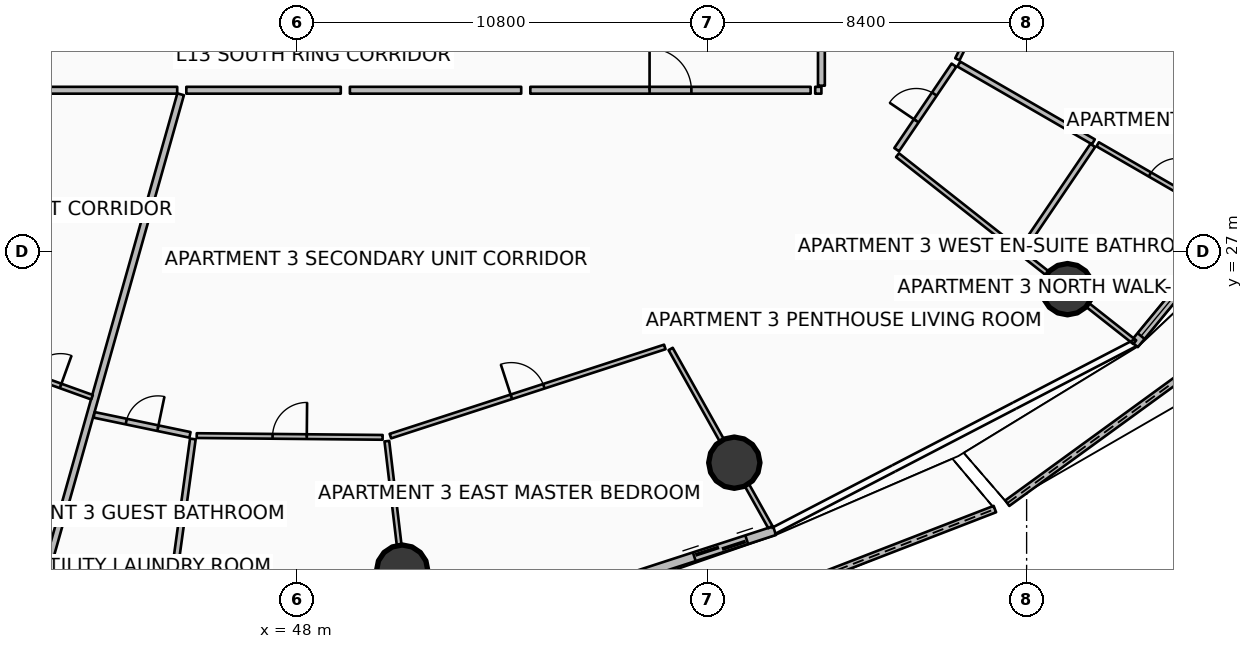
"""IFC4 building model, lengths in metres.
Left out: names, types, materials, properties, quantities, classifications, styles, units other than length and angle.
Written with IfcOpenShell. Run it as: python <this file> out.ifc"""

import sys

from ifc_helpers import new_model, si_unit, direction, frame, frame_2d, origin, origin_2d, place, context, subcontext, project, spatial, polyline, rectangle, circle, outline, extrude, element, fill, save


model = new_model("IFC4")
c1 = context("Model", 3, precision=1e-05, world=origin(), true_north=direction((0.0, 1.0)))
c2 = subcontext(c1, "Body", "Model", "MODEL_VIEW")
j1 = project(units=[si_unit("LENGTHUNIT", "METRE"), si_unit("PLANEANGLEUNIT", "RADIAN")], contexts=[c1])
p1 = place(None, origin())
s1 = spatial("IfcSite", under=j1, at=p1, CompositionType="ELEMENT")
p2 = place(p1, origin())
s2 = spatial("IfcBuilding", under=s1, at=p2, CompositionType="ELEMENT")
p3 = place(p2, frame((0.0, 0.0, 56.4)))
s3 = spatial("IfcBuildingStorey", under=s2, at=p3, CompositionType="ELEMENT", Elevation=56.4)
for number, where, z_axis, x_axis in (
    (1, (50.768, 18.611, 0.0), (0.0, 0.0, 1.0), (1.0, 0.0, 0.0)),
    (2, (59.508, 21.45, 0.0), (0.0, 0.0, 1.0), (1.0, 0.0, 0.0)),
    (3, (68.276, 26.016, 0.0), (0.0, 0.0, 1.0), (1.0, 0.0, 0.0)),
):
    element("IfcColumn", number, at=place(p3, frame(where, z_axis=z_axis, x_axis=x_axis)), inside=s3, PredefinedType="COLUMN", context=c2, shape_type="SweptSolid", body=[
        extrude(circle(Radius=0.675, at=origin_2d()), origin(), (0.0, 0.0, 1.0), 3.5),
    ])
p4 = place(p3, frame((56.446, 16.394, 0.0), z_axis=(0.0, 0.0, 1.0), x_axis=(0.932670029618, 0.360730669409, 0.0)))
e4 = element("IfcWall", 4, at=p4, inside=s3, PredefinedType="PARAPET", context=c2, shape_type="SweptSolid", body=[
    extrude(outline(polyline([(0.0, 0.0), (10.635, 0.0), (10.635, 1.224), (5.317, 1.127), (0.0, 1.148), (0.0, 0.0)])), frame((0.0, 0.09, 0.0), z_axis=(0.0, -1.0, 0.0), x_axis=(1.0, 0.0, 0.0)), (0.0, 0.0, 1.0), 0.18),
])
p5 = place(p3, frame((66.691, 20.385, 0.0), z_axis=(0.0, 0.0, 1.0), x_axis=(0.808711385096, 0.588205657586, 0.0)))
e5 = element("IfcWall", 5, at=p5, inside=s3, PredefinedType="PARAPET", context=c2, shape_type="SweptSolid", body=[
    extrude(outline(polyline([(0.0, 0.0), (11.969, 0.0), (11.969, 1.632), (5.984, 1.418), (0.0, 1.233), (0.0, 0.0)])), frame((0.0, 0.09, 0.0), z_axis=(0.0, -1.0, 0.0), x_axis=(1.0, 0.0, 0.0)), (0.0, 0.0, 1.0), 0.18),
])
p6 = place(p3, frame((50.964, 16.542, 0.0), z_axis=(0.0, 0.0, 1.0), x_axis=(0.951054679225, 0.309022648238, 0.0)))
e6 = element("IfcWall", 6, at=p6, inside=s3, PredefinedType="SOLIDWALL", context=c2, shape_type="SweptSolid", body=[
    extrude(rectangle(XDim=10.097, YDim=0.24, at=frame_2d((5.048, 0.0))), origin(), (0.0, 0.0, 1.0), 2.45),
])
p7 = place(p6, frame((7.877, 0.0, 0.0)))
e7 = element("IfcOpeningElement", 7, at=p7, cuts=e6, PredefinedType="OPENING", context=c2, shape_type="SweptSolid", body=[
    extrude(rectangle(XDim=1.45, YDim=2.15, at=frame_2d((0.725, 1.075))), frame((0.0, 0.13, 0.0), z_axis=(0.0, -1.0, 0.0), x_axis=(1.0, 0.0, 0.0)), (0.0, 0.0, 1.0), 0.26),
])
p8 = place(p6, frame((0.28, 0.0, 0.65)))
e8 = element("IfcOpeningElement", 8, at=p8, cuts=e6, PredefinedType="OPENING", context=c2, shape_type="SweptSolid", body=[
    extrude(rectangle(XDim=1.6, YDim=1.5, at=frame_2d((0.8, 0.75))), frame((0.0, 0.13, 0.0), z_axis=(0.0, -1.0, 0.0), x_axis=(1.0, 0.0, 0.0)), (0.0, 0.0, 1.0), 0.26),
])
p9 = place(p3, frame((70.033, 24.567, 0.0), z_axis=(0.0, 0.0, 1.0), x_axis=(0.636674332663, 0.771132799281, 0.0)))
e9 = element("IfcWall", 9, at=p9, inside=s3, PredefinedType="SOLIDWALL", context=c2, shape_type="SweptSolid", body=[
    extrude(rectangle(XDim=11.851, YDim=0.24, at=frame_2d((5.926, 0.0))), origin(), (0.0, 0.0, 1.0), 2.45),
])
p10 = place(p9, frame((9.631, 0.0, 0.0)))
e10 = element("IfcOpeningElement", 10, at=p10, cuts=e9, PredefinedType="OPENING", context=c2, shape_type="SweptSolid", body=[
    extrude(rectangle(XDim=1.45, YDim=2.15, at=frame_2d((0.725, 1.075))), frame((0.0, 0.13, 0.0), z_axis=(0.0, -1.0, 0.0), x_axis=(1.0, 0.0, 0.0)), (0.0, 0.0, 1.0), 0.26),
])
p11 = place(p9, frame((0.28, 0.0, 0.65)))
e11 = element("IfcOpeningElement", 11, at=p11, cuts=e9, PredefinedType="OPENING", context=c2, shape_type="SweptSolid", body=[
    extrude(rectangle(XDim=1.6, YDim=1.5, at=frame_2d((0.8, 0.75))), frame((0.0, 0.13, 0.0), z_axis=(0.0, -1.0, 0.0), x_axis=(1.0, 0.0, 0.0)), (0.0, 0.0, 1.0), 0.26),
])
p12 = place(p3, frame((44.938, 31.144, 0.0), z_axis=(0.0, 0.0, 1.0), x_axis=(-0.27143758514, -0.962456044385, 0.0)))
e12 = element("IfcWall", 12, at=p12, inside=s3, PredefinedType="PARTITIONING", context=c2, shape_type="SweptSolid", body=[
    extrude(rectangle(XDim=16.693, YDim=0.18, at=frame_2d((8.346, 0.0))), origin(), (0.0, 0.0, 1.0), 2.867),
])
p13 = place(p3, frame((39.646, 31.25, 0.0), z_axis=(0.0, 0.0, 1.0), x_axis=(1.0, 0.0, 0.0)))
e13 = element("IfcWall", 13, at=p13, inside=s3, PredefinedType="PARTITIONING", context=c2, shape_type="SweptSolid", body=[
    extrude(rectangle(XDim=5.203, YDim=0.18, at=frame_2d((2.601, 0.0))), origin(), (0.0, 0.0, 1.0), 2.867),
])
p14 = place(p3, frame((40.154, 24.056, 0.0), z_axis=(0.0, 0.0, 1.0), x_axis=(0.94088502421, -0.338726100584, 0.0)))
e14 = element("IfcWall", 14, at=p14, inside=s3, PredefinedType="PARTITIONING", context=c2, shape_type="SweptSolid", body=[
    extrude(rectangle(XDim=2.607, YDim=0.125, at=frame_2d((1.303, 0.0))), origin(), (0.0, 0.0, 1.0), 2.867),
])
p15 = place(p14, frame((0.879, 0.0, 0.0)))
e15 = element("IfcOpeningElement", 15, at=p15, cuts=e14, PredefinedType="OPENING", context=c2, shape_type="SweptSolid", body=[
    extrude(rectangle(XDim=0.85, YDim=2.06, at=frame_2d((0.425, 1.03))), frame((0.0, 0.073, 0.0), z_axis=(0.0, -1.0, 0.0), x_axis=(1.0, 0.0, 0.0)), (0.0, 0.0, 1.0), 0.145),
])
p16 = place(p3, frame((54.14, 31.25, 0.0), z_axis=(0.0, 0.0, 1.0), x_axis=(1.0, 0.0, 0.0)))
e16 = element("IfcWall", 16, at=p16, inside=s3, PredefinedType="PARTITIONING", context=c2, shape_type="SweptSolid", body=[
    extrude(rectangle(XDim=7.376, YDim=0.18, at=frame_2d((3.688, 0.0))), origin(), (0.0, 0.0, 1.0), 2.867),
])
p17 = place(p16, frame((3.138, 0.0, 0.0)))
e17 = element("IfcOpeningElement", 17, at=p17, cuts=e16, PredefinedType="OPENING", context=c2, shape_type="SweptSolid", body=[
    extrude(rectangle(XDim=1.1, YDim=2.1, at=frame_2d((0.55, 1.05))), frame((0.0, 0.1, 0.0), z_axis=(0.0, -1.0, 0.0), x_axis=(1.0, 0.0, 0.0)), (0.0, 0.0, 1.0), 0.2),
])
p18 = place(p3, frame((45.088, 31.25, 0.0), z_axis=(0.0, 0.0, 1.0), x_axis=(1.0, 0.0, 0.0)))
e18 = element("IfcWall", 18, at=p18, inside=s3, PredefinedType="PARTITIONING", context=c2, shape_type="SweptSolid", body=[
    extrude(rectangle(XDim=4.064, YDim=0.18, at=frame_2d((2.032, 0.0))), origin(), (0.0, 0.0, 1.0), 2.867),
])
p19 = place(p3, frame((42.663, 22.708, 0.0), z_axis=(0.0, 0.0, 1.0), x_axis=(0.97889437531, -0.204366831913, 0.0)))
e19 = element("IfcWall", 19, at=p19, inside=s3, PredefinedType="PARTITIONING", context=c2, shape_type="SweptSolid", body=[
    extrude(rectangle(XDim=2.576, YDim=0.15, at=frame_2d((1.288, 0.0))), origin(), (0.0, 0.0, 1.0), 2.867),
])
p20 = place(p19, frame((0.863, 0.0, 0.0)))
e20 = element("IfcOpeningElement", 20, at=p20, cuts=e19, PredefinedType="OPENING", context=c2, shape_type="SweptSolid", body=[
    extrude(rectangle(XDim=0.85, YDim=2.06, at=frame_2d((0.425, 1.03))), frame((0.0, 0.085, 0.0), z_axis=(0.0, -1.0, 0.0), x_axis=(1.0, 0.0, 0.0)), (0.0, 0.0, 1.0), 0.17),
])
p21 = place(p3, frame((41.517, 18.647, 0.0), z_axis=(0.0, 0.0, 1.0), x_axis=(0.978908333459, -0.204299962518, 0.0)))
e21 = element("IfcWall", 21, at=p21, inside=s3, PredefinedType="PARTITIONING", context=c2, shape_type="SweptSolid", body=[
    extrude(rectangle(XDim=3.158, YDim=0.15, at=frame_2d((1.579, 0.0))), origin(), (0.0, 0.0, 1.0), 2.867),
])
p22 = place(p3, frame((45.26, 22.074, 0.0), z_axis=(0.0, 0.0, 1.0), x_axis=(-0.136279855187, -0.990670379627, 0.0)))
e22 = element("IfcWall", 22, at=p22, inside=s3, PredefinedType="PARTITIONING", context=c2, shape_type="SweptSolid", body=[
    extrude(rectangle(XDim=4.09, YDim=0.15, at=frame_2d((2.045, 0.0))), origin(), (0.0, 0.0, 1.0), 2.94),
])
p23 = place(p3, frame((45.362, 22.163, 0.0), z_axis=(0.0, 0.0, 1.0), x_axis=(0.999955503148, -0.009433542483, 0.0)))
e23 = element("IfcWall", 23, at=p23, inside=s3, PredefinedType="PARTITIONING", context=c2, shape_type="SweptSolid", body=[
    extrude(rectangle(XDim=4.891, YDim=0.125, at=frame_2d((2.446, 0.0))), origin(), (0.0, 0.0, 1.0), 2.94),
])
p24 = place(p23, frame((1.996, 0.0, 0.0)))
e24 = element("IfcOpeningElement", 24, at=p24, cuts=e23, PredefinedType="OPENING", context=c2, shape_type="SweptSolid", body=[
    extrude(rectangle(XDim=0.9, YDim=2.08, at=frame_2d((0.45, 1.04))), frame((0.0, 0.073, 0.0), z_axis=(0.0, -1.0, 0.0), x_axis=(1.0, 0.0, 0.0)), (0.0, 0.0, 1.0), 0.145),
])
p25 = place(p3, frame((49.392, 31.25, 0.0), z_axis=(0.0, 0.0, 1.0), x_axis=(1.0, 0.0, 0.0)))
e25 = element("IfcWall", 25, at=p25, inside=s3, PredefinedType="PARTITIONING", context=c2, shape_type="SweptSolid", body=[
    extrude(rectangle(XDim=4.508, YDim=0.18, at=frame_2d((2.254, 0.0))), origin(), (0.0, 0.0, 1.0), 2.867),
])
p26 = place(p3, frame((50.365, 22.017, 0.0), z_axis=(0.0, 0.0, 1.0), x_axis=(0.117503830854, -0.993072429249, 0.0)))
e26 = element("IfcWall", 26, at=p26, inside=s3, PredefinedType="PARTITIONING", context=c2, shape_type="SweptSolid", body=[
    extrude(rectangle(XDim=5.473, YDim=0.125, at=frame_2d((2.736, 0.0))), origin(), (0.0, 0.0, 1.0), 2.867),
])
p27 = place(p3, frame((57.833, 24.443, 0.0), z_axis=(0.0, 0.0, 1.0), x_axis=(0.488618589391, -0.872497492318, 0.0)))
e27 = element("IfcWall", 27, at=p27, inside=s3, PredefinedType="PARTITIONING", context=c2, shape_type="SweptSolid", body=[
    extrude(rectangle(XDim=5.373, YDim=0.125, at=frame_2d((2.687, 0.0))), origin(), (0.0, 0.0, 1.0), 2.867),
])
p28 = place(p3, frame((50.458, 22.15, 0.0), z_axis=(0.0, 0.0, 1.0), x_axis=(0.951061002784, 0.309003186042, 0.0)))
e28 = element("IfcWall", 28, at=p28, inside=s3, PredefinedType="PARTITIONING", context=c2, shape_type="SweptSolid", body=[
    extrude(rectangle(XDim=7.593, YDim=0.125, at=frame_2d((3.796, 0.0))), origin(), (0.0, 0.0, 1.0), 2.867),
])
p29 = place(p28, frame((3.346, 0.0, 0.0)))
e29 = element("IfcOpeningElement", 29, at=p29, cuts=e28, PredefinedType="OPENING", context=c2, shape_type="SweptSolid", body=[
    extrude(rectangle(XDim=0.9, YDim=2.08, at=frame_2d((0.45, 1.04))), frame((0.0, 0.073, 0.0), z_axis=(0.0, -1.0, 0.0), x_axis=(1.0, 0.0, 0.0)), (0.0, 0.0, 1.0), 0.145),
])
p30 = place(p3, frame((61.636, 31.25, 0.0), z_axis=(0.0, 0.0, 1.0), x_axis=(1.0, 0.0, 0.0)))
e30 = element("IfcWall", 30, at=p30, inside=s3, PredefinedType="PARTITIONING", context=c2, shape_type="SweptSolid", body=[
    extrude(rectangle(XDim=0.164, YDim=0.18, at=frame_2d((0.082, 0.0))), origin(), (0.0, 0.0, 1.0), 2.867),
])
p31 = place(p3, frame((61.8, 31.37, 0.0), z_axis=(0.0, 0.0, 1.0), x_axis=(0.0, 1.0, 0.0)))
e31 = element("IfcWall", 31, at=p31, inside=s3, PredefinedType="PARTITIONING", context=c2, shape_type="SweptSolid", body=[
    extrude(rectangle(XDim=6.618, YDim=0.18, at=frame_2d((3.309, 0.0))), origin(), (0.0, 0.0, 1.0), 2.867),
])
p32 = place(p3, frame((63.803, 29.542, 0.0), z_axis=(0.0, 0.0, 1.0), x_axis=(0.785316547054, -0.619094436191, 0.0)))
e32 = element("IfcWall", 32, at=p32, inside=s3, PredefinedType="PARTITIONING", context=c2, shape_type="SweptSolid", body=[
    extrude(rectangle(XDim=7.949, YDim=0.125, at=frame_2d((3.975, 0.0))), origin(), (0.0, 0.0, 1.0), 2.867),
])
p33 = place(p3, frame((63.781, 29.687, 0.0), z_axis=(0.0, 0.0, 1.0), x_axis=(0.561145635053, 0.82771708709, 0.0)))
e33 = element("IfcWall", 33, at=p33, inside=s3, PredefinedType="PARTITIONING", context=c2, shape_type="SweptSolid", body=[
    extrude(rectangle(XDim=2.685, YDim=0.15, at=frame_2d((1.343, 0.0))), origin(), (0.0, 0.0, 1.0), 2.867),
])
p34 = place(p33, frame((0.918, 0.0, 0.0)))
e34 = element("IfcOpeningElement", 34, at=p34, cuts=e33, PredefinedType="OPENING", context=c2, shape_type="SweptSolid", body=[
    extrude(rectangle(XDim=0.85, YDim=2.06, at=frame_2d((0.425, 1.03))), frame((0.0, 0.085, 0.0), z_axis=(0.0, -1.0, 0.0), x_axis=(1.0, 0.0, 0.0)), (0.0, 0.0, 1.0), 0.17),
])
p35 = place(p3, frame((67.094, 27.074, 0.0), z_axis=(0.0, 0.0, 1.0), x_axis=(0.561136770773, 0.827723096504, 0.0)))
e35 = element("IfcWall", 35, at=p35, inside=s3, PredefinedType="PARTITIONING", context=c2, shape_type="SweptSolid", body=[
    extrude(rectangle(XDim=3.292, YDim=0.15, at=frame_2d((1.646, 0.0))), origin(), (0.0, 0.0, 1.0), 2.867),
])
p36 = place(p3, frame((65.416, 31.939, 0.0), z_axis=(0.0, 0.0, 1.0), x_axis=(0.865897249189, -0.500221904605, 0.0)))
e36 = element("IfcWall", 36, at=p36, inside=s3, PredefinedType="PARTITIONING", context=c2, shape_type="SweptSolid", body=[
    extrude(rectangle(XDim=4.09, YDim=0.15, at=frame_2d((2.045, 0.0))), origin(), (0.0, 0.0, 1.0), 2.94),
])
p37 = place(p3, frame((69.07, 29.828, 0.0), z_axis=(0.0, 0.0, 1.0), x_axis=(0.865911782311, -0.500196746546, 0.0)))
e37 = element("IfcWall", 37, at=p37, inside=s3, PredefinedType="PARTITIONING", context=c2, shape_type="SweptSolid", body=[
    extrude(rectangle(XDim=4.025, YDim=0.125, at=frame_2d((2.012, 0.0))), origin(), (0.0, 0.0, 1.0), 2.94),
])
p38 = place(p37, frame((1.587, 0.0, 0.0)))
e38 = element("IfcOpeningElement", 38, at=p38, cuts=e37, PredefinedType="OPENING", context=c2, shape_type="SweptSolid", body=[
    extrude(rectangle(XDim=0.85, YDim=2.06, at=frame_2d((0.425, 1.03))), frame((0.0, 0.073, 0.0), z_axis=(0.0, -1.0, 0.0), x_axis=(1.0, 0.0, 0.0)), (0.0, 0.0, 1.0), 0.145),
])
p39 = place(p3, frame((66.598, 34.341, 0.0), z_axis=(0.0, 0.0, 1.0), x_axis=(0.9246609872, -0.380791358556, 0.0)))
e39 = element("IfcWall", 39, at=p39, inside=s3, PredefinedType="PARTITIONING", context=c2, shape_type="SweptSolid", body=[
    extrude(rectangle(XDim=9.161, YDim=0.125, at=frame_2d((4.58, 0.0))), origin(), (0.0, 0.0, 1.0), 2.94),
])
p40 = place(p3, frame((65.377, 32.065, 0.0), z_axis=(0.0, 0.0, 1.0), x_axis=(0.441490145673, 0.897266098364, 0.0)))
e40 = element("IfcWall", 40, at=p40, inside=s3, PredefinedType="PARTITIONING", context=c2, shape_type="SweptSolid", body=[
    extrude(rectangle(XDim=2.495, YDim=0.125, at=frame_2d((1.248, 0.0))), origin(), (0.0, 0.0, 1.0), 2.94),
])
p41 = place(p40, frame((0.823, 0.0, 0.0)))
e41 = element("IfcOpeningElement", 41, at=p41, cuts=e40, PredefinedType="OPENING", context=c2, shape_type="SweptSolid", body=[
    extrude(rectangle(XDim=0.85, YDim=2.06, at=frame_2d((0.425, 1.03))), frame((0.0, 0.073, 0.0), z_axis=(0.0, -1.0, 0.0), x_axis=(1.0, 0.0, 0.0)), (0.0, 0.0, 1.0), 0.145),
])
p42 = place(p7, origin())
e42 = element("IfcDoor", 42, at=p42, inside=s3, OperationType="DOUBLE_DOOR_SLIDING", PredefinedType="DOOR", context=c2, shape_type="SweptSolid", body=[
    extrude(rectangle(XDim=1.45, YDim=2.15, at=frame_2d((0.725, 1.075))), frame((0.0, 0.025, 0.0), z_axis=(0.0, -1.0, 0.0), x_axis=(1.0, 0.0, 0.0)), (0.0, 0.0, 1.0), 0.05),
])
fill(e7, e42)
p43 = place(p11, origin())
e43 = element("IfcWindow", 43, at=p43, inside=s3, PartitioningType="SINGLE_PANEL", PredefinedType="WINDOW", context=c2, shape_type="SweptSolid", body=[
    extrude(rectangle(XDim=1.6, YDim=1.5, at=frame_2d((0.8, 0.75))), frame((0.0, 0.03, 0.0), z_axis=(0.0, -1.0, 0.0), x_axis=(1.0, 0.0, 0.0)), (0.0, 0.0, 1.0), 0.06),
])
fill(e11, e43)
p44 = place(p15, origin())
e44 = element("IfcDoor", 44, at=p44, inside=s3, OperationType="SINGLE_SWING_RIGHT", PredefinedType="DOOR", context=c2, shape_type="SweptSolid", body=[
    extrude(rectangle(XDim=0.85, YDim=2.06, at=frame_2d((0.425, 1.03))), frame((0.0, 0.025, 0.0), z_axis=(0.0, -1.0, 0.0), x_axis=(1.0, 0.0, 0.0)), (0.0, 0.0, 1.0), 0.05),
])
fill(e15, e44)
p45 = place(p17, origin())
e45 = element("IfcDoor", 45, at=p45, inside=s3, OperationType="SINGLE_SWING_LEFT", PredefinedType="DOOR", context=c2, shape_type="SweptSolid", body=[
    extrude(rectangle(XDim=1.1, YDim=2.1, at=frame_2d((0.55, 1.05))), frame((0.0, 0.025, 0.0), z_axis=(0.0, -1.0, 0.0), x_axis=(1.0, 0.0, 0.0)), (0.0, 0.0, 1.0), 0.05),
])
fill(e17, e45)
p46 = place(p20, origin())
e46 = element("IfcDoor", 46, at=p46, inside=s3, OperationType="SINGLE_SWING_RIGHT", PredefinedType="DOOR", context=c2, shape_type="SweptSolid", body=[
    extrude(rectangle(XDim=0.85, YDim=2.06, at=frame_2d((0.425, 1.03))), frame((0.0, 0.025, 0.0), z_axis=(0.0, -1.0, 0.0), x_axis=(1.0, 0.0, 0.0)), (0.0, 0.0, 1.0), 0.05),
])
fill(e20, e46)
p47 = place(p24, origin())
e47 = element("IfcDoor", 47, at=p47, inside=s3, OperationType="SINGLE_SWING_RIGHT", PredefinedType="DOOR", context=c2, shape_type="SweptSolid", body=[
    extrude(rectangle(XDim=0.9, YDim=2.08, at=frame_2d((0.45, 1.04))), frame((0.0, 0.025, 0.0), z_axis=(0.0, -1.0, 0.0), x_axis=(1.0, 0.0, 0.0)), (0.0, 0.0, 1.0), 0.05),
])
fill(e24, e47)
p48 = place(p29, origin())
e48 = element("IfcDoor", 48, at=p48, inside=s3, OperationType="SINGLE_SWING_LEFT", PredefinedType="DOOR", context=c2, shape_type="SweptSolid", body=[
    extrude(rectangle(XDim=0.9, YDim=2.08, at=frame_2d((0.45, 1.04))), frame((0.0, 0.025, 0.0), z_axis=(0.0, -1.0, 0.0), x_axis=(1.0, 0.0, 0.0)), (0.0, 0.0, 1.0), 0.05),
])
fill(e29, e48)
p49 = place(p34, origin())
e49 = element("IfcDoor", 49, at=p49, inside=s3, OperationType="SINGLE_SWING_LEFT", PredefinedType="DOOR", context=c2, shape_type="SweptSolid", body=[
    extrude(rectangle(XDim=0.85, YDim=2.06, at=frame_2d((0.425, 1.03))), frame((0.0, 0.025, 0.0), z_axis=(0.0, -1.0, 0.0), x_axis=(1.0, 0.0, 0.0)), (0.0, 0.0, 1.0), 0.05),
])
fill(e34, e49)
p50 = place(p38, origin())
e50 = element("IfcDoor", 50, at=p50, inside=s3, OperationType="SINGLE_SWING_RIGHT", PredefinedType="DOOR", context=c2, shape_type="SweptSolid", body=[
    extrude(rectangle(XDim=0.85, YDim=2.06, at=frame_2d((0.425, 1.03))), frame((0.0, 0.025, 0.0), z_axis=(0.0, -1.0, 0.0), x_axis=(1.0, 0.0, 0.0)), (0.0, 0.0, 1.0), 0.05),
])
fill(e38, e50)
save(model, sys.argv[1])
